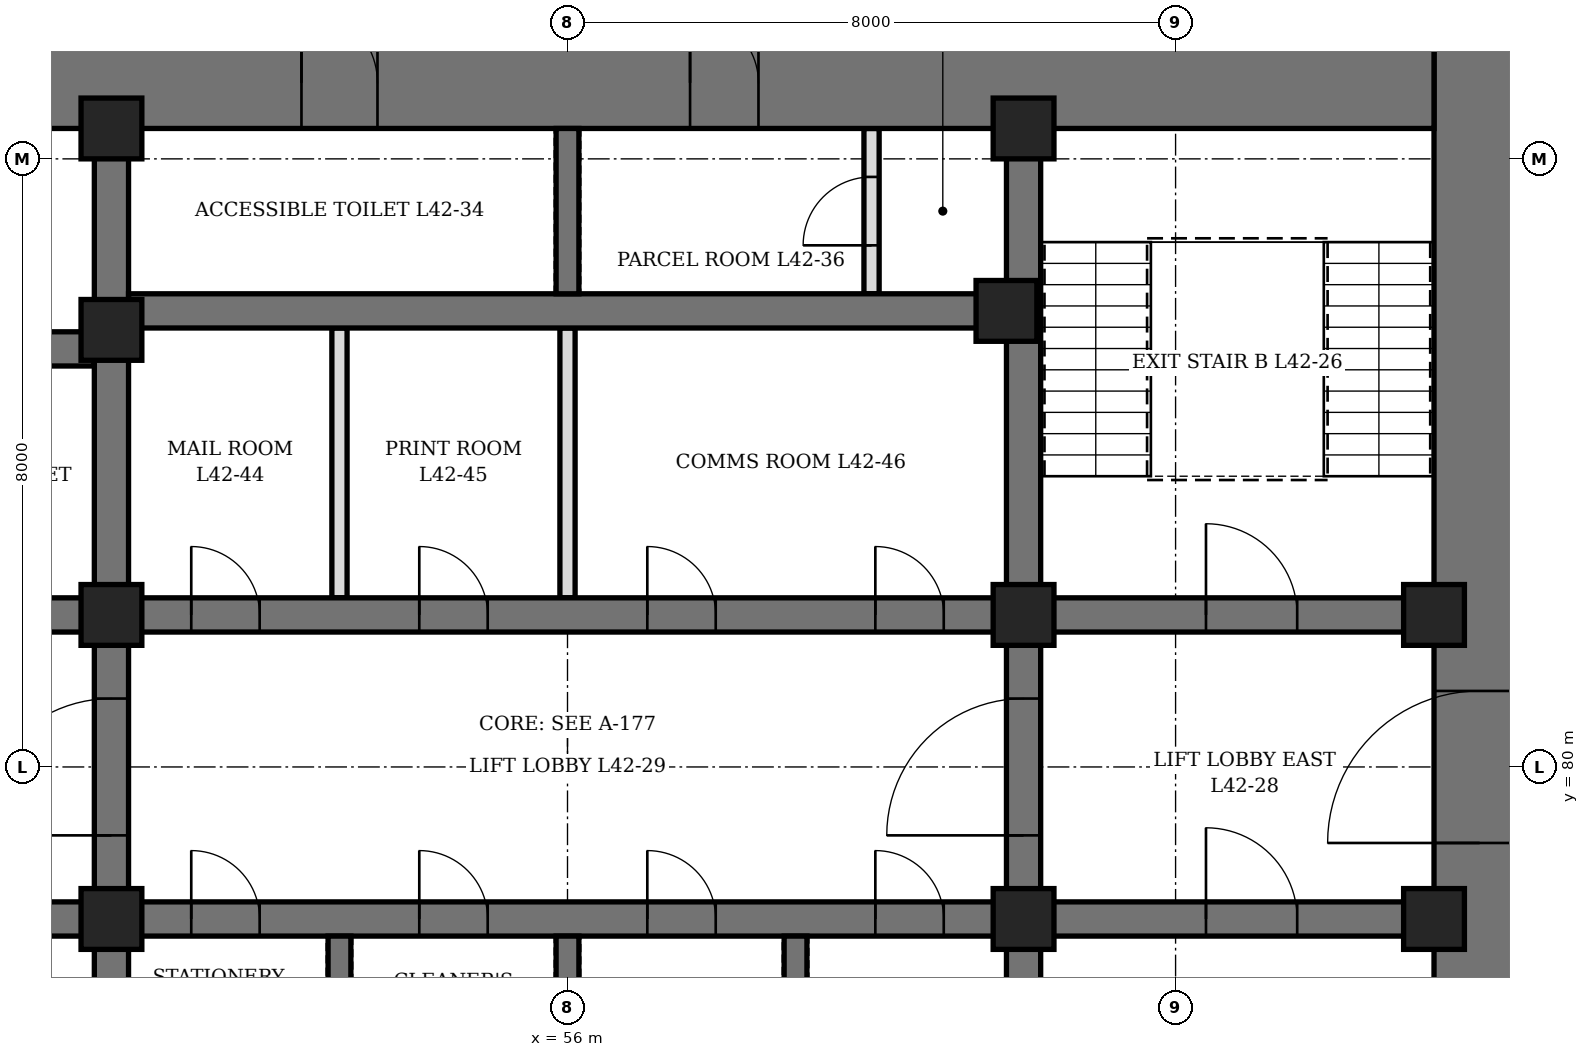
"""IFC4 building model, lengths in metres.
Left out: names, types, materials, properties, quantities, classifications, styles, units other than length and angle.
Written with IfcOpenShell. Run it as: python <this file> out.ifc"""

import sys

from ifc_helpers import new_model, si_unit, direction, frame, frame_2d, origin, origin_2d, place, context, subcontext, project, spatial, rectangle, hollow_rectangle, extrude, element, fill, save


model = new_model("IFC4")
c1 = context("Model", 3, precision=1e-05, world=origin(), true_north=direction((0.0, 1.0)))
c2 = subcontext(c1, "Body", "Model", "MODEL_VIEW")
j1 = project(units=[si_unit("LENGTHUNIT", "METRE"), si_unit("PLANEANGLEUNIT", "RADIAN")], contexts=[c1])
p1 = place(None, origin())
s1 = spatial("IfcSite", under=j1, at=p1, CompositionType="ELEMENT")
p2 = place(p1, origin())
s2 = spatial("IfcBuilding", under=s1, at=p2, CompositionType="ELEMENT")
p3 = place(p2, frame((0.0, 0.0, 189.7)))
s3 = spatial("IfcBuildingStorey", under=s2, at=p3, CompositionType="ELEMENT", Elevation=189.7)
p4 = place(p3, frame((68.0, 70.4, 0.0), z_axis=(0.0, 0.0, 1.0), x_axis=(0.0, 1.0, 0.0)))
e1 = element("IfcWall", 1, at=p4, inside=s3, PredefinedType="SHEAR", context=c2, shape_type="SweptSolid", body=[
    extrude(rectangle(XDim=19.2, YDim=1.2, at=frame_2d((9.6, 0.0))), origin(), (0.0, 0.0, 1.0), 4.2),
])
p5 = place(p4, frame((8.6, 0.0, 0.0)))
e2 = element("IfcOpeningElement", 2, at=p5, cuts=e1, PredefinedType="OPENING", context=c2, shape_type="SweptSolid", body=[
    extrude(rectangle(XDim=2.0, YDim=2.4, at=frame_2d((1.0, 1.2))), frame((0.0, 0.61, 0.0), z_axis=(0.0, -1.0, 0.0), x_axis=(1.0, 0.0, 0.0)), (0.0, 0.0, 1.0), 1.22),
])
p6 = place(p3, frame((44.6, 89.0, 0.0), z_axis=(0.0, 0.0, 1.0), x_axis=(1.0, 0.0, 0.0)))
e3 = element("IfcWall", 3, at=p6, inside=s3, PredefinedType="SHEAR", context=c2, shape_type="SweptSolid", body=[
    extrude(rectangle(XDim=22.8, YDim=1.2, at=frame_2d((11.4, 0.0))), origin(), (0.0, 0.0, 1.0), 4.2),
])
p7 = place(p6, frame((7.9, 0.0, 0.0)))
e4 = element("IfcOpeningElement", 4, at=p7, cuts=e3, PredefinedType="OPENING", context=c2, shape_type="SweptSolid", body=[
    extrude(rectangle(XDim=1.0, YDim=2.1, at=frame_2d((0.5, 1.05))), frame((0.0, 0.61, 0.0), z_axis=(0.0, -1.0, 0.0), x_axis=(1.0, 0.0, 0.0)), (0.0, 0.0, 1.0), 1.22),
])
p8 = place(p6, frame((13.012, 0.0, 0.0)))
e5 = element("IfcOpeningElement", 5, at=p8, cuts=e3, PredefinedType="OPENING", context=c2, shape_type="SweptSolid", body=[
    extrude(rectangle(XDim=0.9, YDim=2.1, at=frame_2d((0.45, 1.05))), frame((0.0, 0.61, 0.0), z_axis=(0.0, -1.0, 0.0), x_axis=(1.0, 0.0, 0.0)), (0.0, 0.0, 1.0), 1.22),
])
p9 = place(p3, frame((50.0, 71.6, 0.0), z_axis=(0.0, 0.0, 1.0), x_axis=(0.0, 1.0, 0.0)))
e6 = element("IfcWall", 6, at=p9, inside=s3, PredefinedType="SHEAR", context=c2, shape_type="SweptSolid", body=[
    extrude(rectangle(XDim=16.8, YDim=0.45, at=frame_2d((8.4, 0.0))), origin(), (0.0, 0.0, 1.0), 4.2),
])
p10 = place(p9, frame((7.5, 0.0, 0.0)))
e7 = element("IfcOpeningElement", 7, at=p10, cuts=e6, PredefinedType="OPENING", context=c2, shape_type="SweptSolid", body=[
    extrude(rectangle(XDim=1.8, YDim=2.4, at=frame_2d((0.9, 1.2))), frame((0.0, 0.235, 0.0), z_axis=(0.0, -1.0, 0.0), x_axis=(1.0, 0.0, 0.0)), (0.0, 0.0, 1.0), 0.47),
])
p11 = place(p3, frame((62.0, 71.6, 0.0), z_axis=(0.0, 0.0, 1.0), x_axis=(0.0, 1.0, 0.0)))
e8 = element("IfcWall", 8, at=p11, inside=s3, PredefinedType="SHEAR", context=c2, shape_type="SweptSolid", body=[
    extrude(rectangle(XDim=16.8, YDim=0.45, at=frame_2d((8.4, 0.0))), origin(), (0.0, 0.0, 1.0), 4.2),
])
p12 = place(p11, frame((7.5, 0.0, 0.0)))
e9 = element("IfcOpeningElement", 9, at=p12, cuts=e8, PredefinedType="OPENING", context=c2, shape_type="SweptSolid", body=[
    extrude(rectangle(XDim=1.8, YDim=2.4, at=frame_2d((0.9, 1.2))), frame((0.0, 0.235, 0.0), z_axis=(0.0, -1.0, 0.0), x_axis=(1.0, 0.0, 0.0)), (0.0, 0.0, 1.0), 0.47),
])
p13 = place(p3, frame((44.6, 78.0, 0.0), z_axis=(0.0, 0.0, 1.0), x_axis=(1.0, 0.0, 0.0)))
e10 = element("IfcWall", 10, at=p13, inside=s3, PredefinedType="SHEAR", context=c2, shape_type="SweptSolid", body=[
    extrude(rectangle(XDim=5.175, YDim=0.45, at=frame_2d((2.587, 0.0))), origin(), (0.0, 0.0, 1.0), 4.2),
])
p14 = place(p13, frame((1.8, 0.0, 0.0)))
e11 = element("IfcOpeningElement", 11, at=p14, cuts=e10, PredefinedType="OPENING", context=c2, shape_type="SweptSolid", body=[
    extrude(rectangle(XDim=1.2, YDim=2.1, at=frame_2d((0.6, 1.05))), frame((0.0, 0.235, 0.0), z_axis=(0.0, -1.0, 0.0), x_axis=(1.0, 0.0, 0.0)), (0.0, 0.0, 1.0), 0.47),
])
p15 = place(p3, frame((44.6, 82.0, 0.0), z_axis=(0.0, 0.0, 1.0), x_axis=(1.0, 0.0, 0.0)))
e12 = element("IfcWall", 12, at=p15, inside=s3, PredefinedType="SHEAR", context=c2, shape_type="SweptSolid", body=[
    extrude(rectangle(XDim=5.175, YDim=0.45, at=frame_2d((2.587, 0.0))), origin(), (0.0, 0.0, 1.0), 4.2),
])
p16 = place(p15, frame((0.7, 0.0, 0.0)))
e13 = element("IfcOpeningElement", 13, at=p16, cuts=e12, PredefinedType="OPENING", context=c2, shape_type="SweptSolid", body=[
    extrude(rectangle(XDim=0.9, YDim=2.1, at=frame_2d((0.45, 1.05))), frame((0.0, 0.235, 0.0), z_axis=(0.0, -1.0, 0.0), x_axis=(1.0, 0.0, 0.0)), (0.0, 0.0, 1.0), 0.47),
])
p17 = place(p3, frame((44.6, 85.5, 0.0), z_axis=(0.0, 0.0, 1.0), x_axis=(1.0, 0.0, 0.0)))
e14 = element("IfcWall", 14, at=p17, inside=s3, PredefinedType="SHEAR", context=c2, shape_type="SweptSolid", body=[
    extrude(rectangle(XDim=5.175, YDim=0.45, at=frame_2d((2.587, 0.0))), origin(), (0.0, 0.0, 1.0), 4.2),
])
p18 = place(p17, frame((0.7, 0.0, 0.0)))
e15 = element("IfcOpeningElement", 15, at=p18, cuts=e14, PredefinedType="OPENING", context=c2, shape_type="SweptSolid", body=[
    extrude(rectangle(XDim=0.9, YDim=2.1, at=frame_2d((0.45, 1.05))), frame((0.0, 0.235, 0.0), z_axis=(0.0, -1.0, 0.0), x_axis=(1.0, 0.0, 0.0)), (0.0, 0.0, 1.0), 0.47),
])
p19 = place(p3, frame((62.225, 78.0, 0.0), z_axis=(0.0, 0.0, 1.0), x_axis=(1.0, 0.0, 0.0)))
e16 = element("IfcWall", 16, at=p19, inside=s3, PredefinedType="SHEAR", context=c2, shape_type="SweptSolid", body=[
    extrude(rectangle(XDim=5.175, YDim=0.45, at=frame_2d((2.587, 0.0))), origin(), (0.0, 0.0, 1.0), 4.2),
])
p20 = place(p19, frame((2.175, 0.0, 0.0)))
e17 = element("IfcOpeningElement", 17, at=p20, cuts=e16, PredefinedType="OPENING", context=c2, shape_type="SweptSolid", body=[
    extrude(rectangle(XDim=1.2, YDim=2.1, at=frame_2d((0.6, 1.05))), frame((0.0, 0.235, 0.0), z_axis=(0.0, -1.0, 0.0), x_axis=(1.0, 0.0, 0.0)), (0.0, 0.0, 1.0), 0.47),
])
p21 = place(p3, frame((62.225, 82.0, 0.0), z_axis=(0.0, 0.0, 1.0), x_axis=(1.0, 0.0, 0.0)))
e18 = element("IfcWall", 18, at=p21, inside=s3, PredefinedType="SHEAR", context=c2, shape_type="SweptSolid", body=[
    extrude(rectangle(XDim=5.175, YDim=0.45, at=frame_2d((2.587, 0.0))), origin(), (0.0, 0.0, 1.0), 4.2),
])
p22 = place(p21, frame((2.175, 0.0, 0.0)))
e19 = element("IfcOpeningElement", 19, at=p22, cuts=e18, PredefinedType="OPENING", context=c2, shape_type="SweptSolid", body=[
    extrude(rectangle(XDim=1.2, YDim=2.1, at=frame_2d((0.6, 1.05))), frame((0.0, 0.235, 0.0), z_axis=(0.0, -1.0, 0.0), x_axis=(1.0, 0.0, 0.0)), (0.0, 0.0, 1.0), 0.47),
])
p23 = place(p3, frame((50.225, 78.0, 0.0), z_axis=(0.0, 0.0, 1.0), x_axis=(1.0, 0.0, 0.0)))
e20 = element("IfcWall", 20, at=p23, inside=s3, PredefinedType="SHEAR", context=c2, shape_type="SweptSolid", body=[
    extrude(rectangle(XDim=11.55, YDim=0.45, at=frame_2d((5.775, 0.0))), origin(), (0.0, 0.0, 1.0), 4.2),
])
p24 = place(p23, frame((0.825, 0.0, 0.0)))
e21 = element("IfcOpeningElement", 21, at=p24, cuts=e20, PredefinedType="OPENING", context=c2, shape_type="SweptSolid", body=[
    extrude(rectangle(XDim=0.9, YDim=2.1, at=frame_2d((0.45, 1.05))), frame((0.0, 0.235, 0.0), z_axis=(0.0, -1.0, 0.0), x_axis=(1.0, 0.0, 0.0)), (0.0, 0.0, 1.0), 0.47),
])
p25 = place(p23, frame((3.825, 0.0, 0.0)))
e22 = element("IfcOpeningElement", 22, at=p25, cuts=e20, PredefinedType="OPENING", context=c2, shape_type="SweptSolid", body=[
    extrude(rectangle(XDim=0.9, YDim=2.1, at=frame_2d((0.45, 1.05))), frame((0.0, 0.235, 0.0), z_axis=(0.0, -1.0, 0.0), x_axis=(1.0, 0.0, 0.0)), (0.0, 0.0, 1.0), 0.47),
])
p26 = place(p23, frame((6.825, 0.0, 0.0)))
e23 = element("IfcOpeningElement", 23, at=p26, cuts=e20, PredefinedType="OPENING", context=c2, shape_type="SweptSolid", body=[
    extrude(rectangle(XDim=0.9, YDim=2.1, at=frame_2d((0.45, 1.05))), frame((0.0, 0.235, 0.0), z_axis=(0.0, -1.0, 0.0), x_axis=(1.0, 0.0, 0.0)), (0.0, 0.0, 1.0), 0.47),
])
p27 = place(p23, frame((9.825, 0.0, 0.0)))
e24 = element("IfcOpeningElement", 24, at=p27, cuts=e20, PredefinedType="OPENING", context=c2, shape_type="SweptSolid", body=[
    extrude(rectangle(XDim=0.9, YDim=2.1, at=frame_2d((0.45, 1.05))), frame((0.0, 0.235, 0.0), z_axis=(0.0, -1.0, 0.0), x_axis=(1.0, 0.0, 0.0)), (0.0, 0.0, 1.0), 0.47),
])
p28 = place(p3, frame((50.225, 82.0, 0.0), z_axis=(0.0, 0.0, 1.0), x_axis=(1.0, 0.0, 0.0)))
e25 = element("IfcWall", 25, at=p28, inside=s3, PredefinedType="SHEAR", context=c2, shape_type="SweptSolid", body=[
    extrude(rectangle(XDim=11.55, YDim=0.45, at=frame_2d((5.775, 0.0))), origin(), (0.0, 0.0, 1.0), 4.2),
])
p29 = place(p28, frame((0.825, 0.0, 0.0)))
e26 = element("IfcOpeningElement", 26, at=p29, cuts=e25, PredefinedType="OPENING", context=c2, shape_type="SweptSolid", body=[
    extrude(rectangle(XDim=0.9, YDim=2.1, at=frame_2d((0.45, 1.05))), frame((0.0, 0.235, 0.0), z_axis=(0.0, -1.0, 0.0), x_axis=(1.0, 0.0, 0.0)), (0.0, 0.0, 1.0), 0.47),
])
p30 = place(p28, frame((3.825, 0.0, 0.0)))
e27 = element("IfcOpeningElement", 27, at=p30, cuts=e25, PredefinedType="OPENING", context=c2, shape_type="SweptSolid", body=[
    extrude(rectangle(XDim=0.9, YDim=2.1, at=frame_2d((0.45, 1.05))), frame((0.0, 0.235, 0.0), z_axis=(0.0, -1.0, 0.0), x_axis=(1.0, 0.0, 0.0)), (0.0, 0.0, 1.0), 0.47),
])
p31 = place(p28, frame((6.825, 0.0, 0.0)))
e28 = element("IfcOpeningElement", 28, at=p31, cuts=e25, PredefinedType="OPENING", context=c2, shape_type="SweptSolid", body=[
    extrude(rectangle(XDim=0.9, YDim=2.1, at=frame_2d((0.45, 1.05))), frame((0.0, 0.235, 0.0), z_axis=(0.0, -1.0, 0.0), x_axis=(1.0, 0.0, 0.0)), (0.0, 0.0, 1.0), 0.47),
])
p32 = place(p28, frame((9.825, 0.0, 0.0)))
e29 = element("IfcOpeningElement", 29, at=p32, cuts=e25, PredefinedType="OPENING", context=c2, shape_type="SweptSolid", body=[
    extrude(rectangle(XDim=0.9, YDim=2.1, at=frame_2d((0.45, 1.05))), frame((0.0, 0.235, 0.0), z_axis=(0.0, -1.0, 0.0), x_axis=(1.0, 0.0, 0.0)), (0.0, 0.0, 1.0), 0.47),
])
p33 = place(p3, frame((50.225, 86.0, 0.0), z_axis=(0.0, 0.0, 1.0), x_axis=(1.0, 0.0, 0.0)))
e30 = element("IfcWall", 30, at=p33, inside=s3, PredefinedType="SHEAR", context=c2, shape_type="SweptSolid", body=[
    extrude(rectangle(XDim=11.55, YDim=0.45, at=frame_2d((5.775, 0.0))), origin(), (0.0, 0.0, 1.0), 4.2),
])
for number, where, z_axis, x_axis in (
    (31, (53.0, 74.15, 0.0), (0.0, 0.0, 1.0), (0.0, 1.0, 0.0)),
    (32, (56.0, 74.15, 0.0), (0.0, 0.0, 1.0), (0.0, 1.0, 0.0)),
    (33, (59.0, 74.15, 0.0), (0.0, 0.0, 1.0), (0.0, 1.0, 0.0)),
):
    element("IfcWall", number, at=place(p3, frame(where, z_axis=z_axis, x_axis=x_axis)), inside=s3, PredefinedType="SHEAR", context=c2, shape_type="SweptSolid", body=[
        extrude(rectangle(XDim=3.625, YDim=0.3, at=frame_2d((1.812, 0.0))), origin(), (0.0, 0.0, 1.0), 4.2),
    ])
p34 = place(p3, frame((56.0, 86.225, 0.0), z_axis=(0.0, 0.0, 1.0), x_axis=(0.0, 1.0, 0.0)))
e34 = element("IfcWall", 34, at=p34, inside=s3, PredefinedType="SHEAR", context=c2, shape_type="SweptSolid", body=[
    extrude(rectangle(XDim=2.175, YDim=0.3, at=frame_2d((1.087, 0.0))), origin(), (0.0, 0.0, 1.0), 4.2),
])
for number, where, z_axis, x_axis in (
    (35, (50.0, 78.0, 0.0), (0.0, 0.0, 1.0), (1.0, 0.0, 0.0)),
    (36, (50.0, 82.0, 0.0), (0.0, 0.0, 1.0), (1.0, 0.0, 0.0)),
    (37, (50.0, 85.75, 0.0), (0.0, 0.0, 1.0), (1.0, 0.0, 0.0)),
    (38, (50.0, 88.4, 0.0), (0.0, 0.0, 1.0), (1.0, 0.0, 0.0)),
    (39, (61.775, 86.0, 0.0), (0.0, 0.0, 1.0), (1.0, 0.0, 0.0)),
    (40, (62.0, 78.0, 0.0), (0.0, 0.0, 1.0), (1.0, 0.0, 0.0)),
    (41, (62.0, 82.0, 0.0), (0.0, 0.0, 1.0), (1.0, 0.0, 0.0)),
    (42, (62.0, 88.4, 0.0), (0.0, 0.0, 1.0), (1.0, 0.0, 0.0)),
    (43, (67.4, 78.0, 0.0), (0.0, 0.0, 1.0), (1.0, 0.0, 0.0)),
    (44, (67.4, 82.0, 0.0), (0.0, 0.0, 1.0), (1.0, 0.0, 0.0)),
):
    element("IfcColumn", number, at=place(p3, frame(where, z_axis=z_axis, x_axis=x_axis)), inside=s3, PredefinedType="COLUMN", context=c2, shape_type="SweptSolid", body=[
        extrude(hollow_rectangle(XDim=0.8, YDim=0.8, WallThickness=0.1, at=origin_2d()), origin(), (0.0, 0.0, 1.0), 4.2),
    ])
p35 = place(p3, frame((60.0, 86.225, 0.0), z_axis=(0.0, 0.0, 1.0), x_axis=(0.0, 1.0, 0.0)))
e45 = element("IfcWall", 45, at=p35, inside=s3, PredefinedType="PARTITIONING", context=c2, shape_type="SweptSolid", body=[
    extrude(rectangle(XDim=2.175, YDim=0.2, at=frame_2d((1.087, 0.0))), origin(), (0.0, 0.0, 1.0), 4.04),
])
p36 = place(p35, frame((0.637, 0.0, 0.0)))
e46 = element("IfcOpeningElement", 46, at=p36, cuts=e45, PredefinedType="OPENING", context=c2, shape_type="SweptSolid", body=[
    extrude(rectangle(XDim=0.9, YDim=2.1, at=frame_2d((0.45, 1.05))), frame((0.0, 0.11, 0.0), z_axis=(0.0, -1.0, 0.0), x_axis=(1.0, 0.0, 0.0)), (0.0, 0.0, 1.0), 0.22),
])
p37 = place(p3, frame((53.0, 82.225, 0.0), z_axis=(0.0, 0.0, 1.0), x_axis=(0.0, 1.0, 0.0)))
e47 = element("IfcWall", 47, at=p37, inside=s3, PredefinedType="PARTITIONING", context=c2, shape_type="SweptSolid", body=[
    extrude(rectangle(XDim=3.55, YDim=0.2, at=frame_2d((1.775, 0.0))), origin(), (0.0, 0.0, 1.0), 4.04),
])
p38 = place(p3, frame((56.0, 82.225, 0.0), z_axis=(0.0, 0.0, 1.0), x_axis=(0.0, 1.0, 0.0)))
e48 = element("IfcWall", 48, at=p38, inside=s3, PredefinedType="PARTITIONING", context=c2, shape_type="SweptSolid", body=[
    extrude(rectangle(XDim=3.55, YDim=0.2, at=frame_2d((1.775, 0.0))), origin(), (0.0, 0.0, 1.0), 2.54),
])
p39 = place(p7, origin())
e49 = element("IfcDoor", 49, at=p39, inside=s3, OperationType="SINGLE_SWING_LEFT", PredefinedType="DOOR", context=c2, shape_type="SweptSolid", body=[
    extrude(rectangle(XDim=1.0, YDim=2.1, at=frame_2d((0.5, 1.05))), frame((0.0, 0.35, 0.0), z_axis=(0.0, -1.0, 0.0), x_axis=(1.0, 0.0, 0.0)), (0.0, 0.0, 1.0), 0.7),
])
fill(e4, e49)
p40 = place(p8, origin())
e50 = element("IfcDoor", 50, at=p40, inside=s3, OperationType="SINGLE_SWING_LEFT", PredefinedType="DOOR", context=c2, shape_type="SweptSolid", body=[
    extrude(rectangle(XDim=0.9, YDim=2.1, at=frame_2d((0.45, 1.05))), frame((0.0, 0.35, 0.0), z_axis=(0.0, -1.0, 0.0), x_axis=(1.0, 0.0, 0.0)), (0.0, 0.0, 1.0), 0.7),
])
fill(e5, e50)
p41 = place(p36, origin())
e51 = element("IfcDoor", 51, at=p41, inside=s3, OperationType="SINGLE_SWING_LEFT", PredefinedType="DOOR", context=c2, shape_type="SweptSolid", body=[
    extrude(rectangle(XDim=0.9, YDim=2.1, at=frame_2d((0.45, 1.05))), frame((0.0, 0.1, 0.0), z_axis=(0.0, -1.0, 0.0), x_axis=(1.0, 0.0, 0.0)), (0.0, 0.0, 1.0), 0.199),
])
fill(e46, e51)
p42 = place(p24, origin())
e52 = element("IfcDoor", 52, at=p42, inside=s3, OperationType="SINGLE_SWING_LEFT", PredefinedType="DOOR", context=c2, shape_type="SweptSolid", body=[
    extrude(rectangle(XDim=0.9, YDim=2.1, at=frame_2d((0.45, 1.05))), frame((0.0, 0.225, 0.0), z_axis=(0.0, -1.0, 0.0), x_axis=(1.0, 0.0, 0.0)), (0.0, 0.0, 1.0), 0.449),
])
fill(e21, e52)
p43 = place(p25, origin())
e53 = element("IfcDoor", 53, at=p43, inside=s3, OperationType="SINGLE_SWING_LEFT", PredefinedType="DOOR", context=c2, shape_type="SweptSolid", body=[
    extrude(rectangle(XDim=0.9, YDim=2.1, at=frame_2d((0.45, 1.05))), frame((0.0, 0.225, 0.0), z_axis=(0.0, -1.0, 0.0), x_axis=(1.0, 0.0, 0.0)), (0.0, 0.0, 1.0), 0.449),
])
fill(e22, e53)
p44 = place(p26, origin())
e54 = element("IfcDoor", 54, at=p44, inside=s3, OperationType="SINGLE_SWING_LEFT", PredefinedType="DOOR", context=c2, shape_type="SweptSolid", body=[
    extrude(rectangle(XDim=0.9, YDim=2.1, at=frame_2d((0.45, 1.05))), frame((0.0, 0.225, 0.0), z_axis=(0.0, -1.0, 0.0), x_axis=(1.0, 0.0, 0.0)), (0.0, 0.0, 1.0), 0.449),
])
fill(e23, e54)
p45 = place(p27, origin())
e55 = element("IfcDoor", 55, at=p45, inside=s3, OperationType="SINGLE_SWING_LEFT", PredefinedType="DOOR", context=c2, shape_type="SweptSolid", body=[
    extrude(rectangle(XDim=0.9, YDim=2.1, at=frame_2d((0.45, 1.05))), frame((0.0, 0.225, 0.0), z_axis=(0.0, -1.0, 0.0), x_axis=(1.0, 0.0, 0.0)), (0.0, 0.0, 1.0), 0.449),
])
fill(e24, e55)
p46 = place(p29, origin())
e56 = element("IfcDoor", 56, at=p46, inside=s3, OperationType="SINGLE_SWING_LEFT", PredefinedType="DOOR", context=c2, shape_type="SweptSolid", body=[
    extrude(rectangle(XDim=0.9, YDim=2.1, at=frame_2d((0.45, 1.05))), frame((0.0, 0.225, 0.0), z_axis=(0.0, -1.0, 0.0), x_axis=(1.0, 0.0, 0.0)), (0.0, 0.0, 1.0), 0.449),
])
fill(e26, e56)
p47 = place(p30, origin())
e57 = element("IfcDoor", 57, at=p47, inside=s3, OperationType="SINGLE_SWING_LEFT", PredefinedType="DOOR", context=c2, shape_type="SweptSolid", body=[
    extrude(rectangle(XDim=0.9, YDim=2.1, at=frame_2d((0.45, 1.05))), frame((0.0, 0.225, 0.0), z_axis=(0.0, -1.0, 0.0), x_axis=(1.0, 0.0, 0.0)), (0.0, 0.0, 1.0), 0.449),
])
fill(e27, e57)
p48 = place(p31, origin())
e58 = element("IfcDoor", 58, at=p48, inside=s3, OperationType="SINGLE_SWING_LEFT", PredefinedType="DOOR", context=c2, shape_type="SweptSolid", body=[
    extrude(rectangle(XDim=0.9, YDim=2.1, at=frame_2d((0.45, 1.05))), frame((0.0, 0.225, 0.0), z_axis=(0.0, -1.0, 0.0), x_axis=(1.0, 0.0, 0.0)), (0.0, 0.0, 1.0), 0.449),
])
fill(e28, e58)
p49 = place(p32, origin())
e59 = element("IfcDoor", 59, at=p49, inside=s3, OperationType="SINGLE_SWING_LEFT", PredefinedType="DOOR", context=c2, shape_type="SweptSolid", body=[
    extrude(rectangle(XDim=0.9, YDim=2.1, at=frame_2d((0.45, 1.05))), frame((0.0, 0.225, 0.0), z_axis=(0.0, -1.0, 0.0), x_axis=(1.0, 0.0, 0.0)), (0.0, 0.0, 1.0), 0.449),
])
fill(e29, e59)
p50 = place(p22, origin())
e60 = element("IfcDoor", 60, at=p50, inside=s3, OperationType="SINGLE_SWING_LEFT", PredefinedType="DOOR", context=c2, shape_type="SweptSolid", body=[
    extrude(rectangle(XDim=1.2, YDim=2.1, at=frame_2d((0.6, 1.05))), frame((0.0, 0.225, 0.0), z_axis=(0.0, -1.0, 0.0), x_axis=(1.0, 0.0, 0.0)), (0.0, 0.0, 1.0), 0.449),
])
fill(e19, e60)
p51 = place(p5, origin())
e61 = element("IfcDoor", 61, at=p51, inside=s3, OperationType="DOUBLE_DOOR_SINGLE_SWING", PredefinedType="DOOR", context=c2, shape_type="SweptSolid", body=[
    extrude(rectangle(XDim=2.0, YDim=2.4, at=frame_2d((1.0, 1.2))), frame((0.0, 0.35, 0.0), z_axis=(0.0, -1.0, 0.0), x_axis=(1.0, 0.0, 0.0)), (0.0, 0.0, 1.0), 0.7),
])
fill(e2, e61)
p52 = place(p10, origin())
e62 = element("IfcDoor", 62, at=p52, inside=s3, OperationType="DOUBLE_DOOR_SINGLE_SWING", PredefinedType="DOOR", context=c2, shape_type="SweptSolid", body=[
    extrude(rectangle(XDim=1.8, YDim=2.4, at=frame_2d((0.9, 1.2))), frame((0.0, 0.225, 0.0), z_axis=(0.0, -1.0, 0.0), x_axis=(1.0, 0.0, 0.0)), (0.0, 0.0, 1.0), 0.449),
])
fill(e7, e62)
p53 = place(p12, origin())
e63 = element("IfcDoor", 63, at=p53, inside=s3, OperationType="DOUBLE_DOOR_SINGLE_SWING", PredefinedType="DOOR", context=c2, shape_type="SweptSolid", body=[
    extrude(rectangle(XDim=1.8, YDim=2.4, at=frame_2d((0.9, 1.2))), frame((0.0, 0.225, 0.0), z_axis=(0.0, -1.0, 0.0), x_axis=(1.0, 0.0, 0.0)), (0.0, 0.0, 1.0), 0.449),
])
fill(e9, e63)
p54 = place(p20, origin())
e64 = element("IfcDoor", 64, at=p54, inside=s3, OperationType="SINGLE_SWING_RIGHT", PredefinedType="DOOR", context=c2, shape_type="SweptSolid", body=[
    extrude(rectangle(XDim=1.2, YDim=2.1, at=frame_2d((0.6, 1.05))), frame((0.0, 0.225, 0.0), z_axis=(0.0, -1.0, 0.0), x_axis=(1.0, 0.0, 0.0)), (0.0, 0.0, 1.0), 0.449),
])
fill(e17, e64)
save(model, sys.argv[1])
